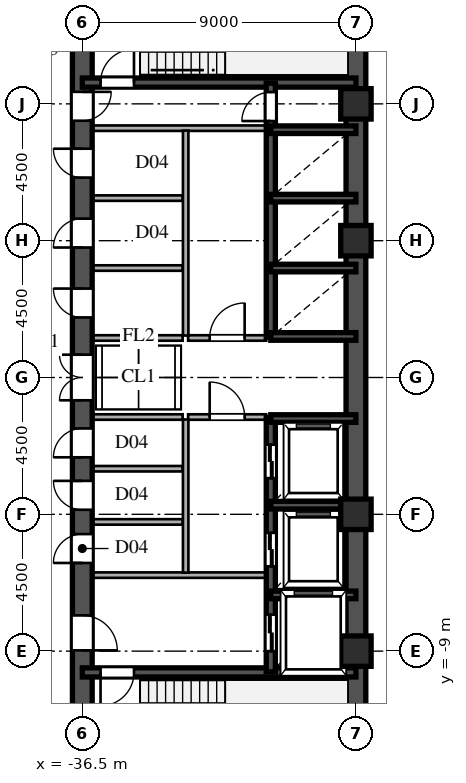
"""IFC4 building model, lengths in metres.
Left out: names, types, materials, properties, quantities, classifications, styles, units other than length and angle.
Written with IfcOpenShell. Run it as: python <this file> out.ifc"""

import sys

from ifc_helpers import new_model, si_unit, direction, frame, frame_2d, origin, origin_2d, place, context, subcontext, project, spatial, rectangle, hollow_rectangle, extrude, source, transform, mapped, element, fill, save


model = new_model("IFC4")
c1 = context("Model", 3, precision=1e-05, world=origin(), true_north=direction((0.0, 1.0)))
c2 = subcontext(c1, "Body", "Model", "MODEL_VIEW")
j1 = project(units=[si_unit("LENGTHUNIT", "METRE"), si_unit("PLANEANGLEUNIT", "RADIAN")], contexts=[c1])
p1 = place(None, origin())
s1 = spatial("IfcSite", under=j1, at=p1, CompositionType="ELEMENT")
p2 = place(p1, origin())
s2 = spatial("IfcBuilding", under=s1, at=p2, CompositionType="ELEMENT")
p3 = place(p2, frame((0.0, 0.0, 121.2)))
s3 = spatial("IfcBuildingStorey", under=s2, at=p3, CompositionType="ELEMENT", Elevation=121.2)
m1 = source(origin(), c2, "Body", "SweptSolid", [
    extrude(hollow_rectangle(XDim=1.0, YDim=1.0, WallThickness=0.042, at=origin_2d()), origin(), (0.0, 0.0, 1.0), 3.6),
])
for number, where, z_axis, x_axis in (
    (1, (-27.5, -9.0, 0.0), (0.0, 0.0, 1.0), (1.0, 0.0, 0.0)),
    (2, (-27.5, -4.5, 0.0), (0.0, 0.0, 1.0), (1.0, 0.0, 0.0)),
    (3, (-27.5, 4.5, 0.0), (0.0, 0.0, 1.0), (1.0, 0.0, 0.0)),
    (4, (-27.5, 9.0, 0.0), (0.0, 0.0, 1.0), (1.0, 0.0, 0.0)),
):
    element("IfcColumn", number, at=place(p3, frame(where, z_axis=z_axis, x_axis=x_axis)), inside=s3, PredefinedType="COLUMN", context=c2, shape_type="MappedRepresentation", body=[
        mapped(m1, transform((0.0, 0.0, 0.0), scale=1.0)),
    ])
for number, where, z_axis, x_axis in (
    (5, (-27.5, -13.5, 0.0), (0.0, 0.0, 1.0), (0.0, 1.0, 0.0)),
    (6, (-27.5, 1.3, 0.0), (0.0, 0.0, 1.0), (0.0, 1.0, 0.0)),
):
    element("IfcWall", number, at=place(p3, frame(where, z_axis=z_axis, x_axis=x_axis)), inside=s3, PredefinedType="SHEAR", context=c2, shape_type="SweptSolid", body=[
        extrude(rectangle(XDim=12.2, YDim=0.65, at=frame_2d((6.1, 0.0))), origin(), (0.0, 0.0, 1.0), 3.38),
    ])
p4 = place(p3, frame((-27.5, -1.3, 0.0), z_axis=(0.0, 0.0, 1.0), x_axis=(0.0, 1.0, 0.0)))
e7 = element("IfcWall", 7, at=p4, inside=s3, PredefinedType="SHEAR", context=c2, shape_type="SweptSolid", body=[
    extrude(rectangle(XDim=2.6, YDim=0.65, at=frame_2d((1.3, 0.0))), origin(), (0.0, 0.0, 1.0), 3.38),
])
p5 = place(p3, frame((-36.5, -13.65, 0.0), z_axis=(0.0, 0.0, 1.0), x_axis=(0.0, 1.0, 0.0)))
e8 = element("IfcWall", 8, at=p5, inside=s3, PredefinedType="SHEAR", context=c2, shape_type="SweptSolid", body=[
    extrude(rectangle(XDim=7.15, YDim=0.65, at=frame_2d((3.575, 0.0))), origin(), (0.0, 0.0, 1.0), 3.38),
])
p6 = place(p5, frame((4.675, 0.0, 0.0)))
e9 = element("IfcOpeningElement", 9, at=p6, cuts=e8, PredefinedType="OPENING", context=c2, shape_type="SweptSolid", body=[
    extrude(rectangle(XDim=1.15, YDim=2.2, at=frame_2d((0.575, 1.1))), frame((0.0, 0.335, 0.0), z_axis=(0.0, -1.0, 0.0), x_axis=(1.0, 0.0, 0.0)), (0.0, 0.0, 1.0), 0.67),
])
p7 = place(p3, frame((-36.5, -1.3, 0.0), z_axis=(0.0, 0.0, 1.0), x_axis=(0.0, 1.0, 0.0)))
e10 = element("IfcWall", 10, at=p7, inside=s3, PredefinedType="SHEAR", context=c2, shape_type="SweptSolid", body=[
    extrude(rectangle(XDim=2.6, YDim=0.65, at=frame_2d((1.3, 0.0))), origin(), (0.0, 0.0, 1.0), 3.38),
])
p8 = place(p7, frame((0.55, 0.0, 0.0)))
e11 = element("IfcOpeningElement", 11, at=p8, cuts=e10, PredefinedType="OPENING", context=c2, shape_type="SweptSolid", body=[
    extrude(rectangle(XDim=1.5, YDim=2.3, at=frame_2d((0.75, 1.15))), frame((0.0, 0.335, 0.0), z_axis=(0.0, -1.0, 0.0), x_axis=(1.0, 0.0, 0.0)), (0.0, 0.0, 1.0), 0.67),
])
p9 = place(p3, frame((-36.5, 8.2, 0.0), z_axis=(0.0, 0.0, 1.0), x_axis=(0.0, 1.0, 0.0)))
e12 = element("IfcWall", 12, at=p9, inside=s3, PredefinedType="SHEAR", context=c2, shape_type="SweptSolid", body=[
    extrude(rectangle(XDim=5.45, YDim=0.65, at=frame_2d((2.725, 0.0))), origin(), (0.0, 0.0, 1.0), 3.38),
])
p10 = place(p9, frame((0.245, 0.0, 0.0)))
e13 = element("IfcOpeningElement", 13, at=p10, cuts=e12, PredefinedType="OPENING", context=c2, shape_type="SweptSolid", body=[
    extrude(rectangle(XDim=0.95, YDim=2.15, at=frame_2d((0.475, 1.075))), frame((0.0, 0.335, 0.0), z_axis=(0.0, -1.0, 0.0), x_axis=(1.0, 0.0, 0.0)), (0.0, 0.0, 1.0), 0.67),
])
p11 = place(p3, frame((-36.5, -6.5, 0.0), z_axis=(0.0, 0.0, 1.0), x_axis=(0.0, 1.0, 0.0)))
e14 = element("IfcWall", 14, at=p11, inside=s3, PredefinedType="SHEAR", context=c2, shape_type="SweptSolid", body=[
    extrude(rectangle(XDim=1.75, YDim=0.65, at=frame_2d((0.875, 0.0))), origin(), (0.0, 0.0, 1.0), 3.38),
])
p12 = place(p11, frame((0.4, 0.0, 0.0)))
e15 = element("IfcOpeningElement", 15, at=p12, cuts=e14, PredefinedType="OPENING", context=c2, shape_type="SweptSolid", body=[
    extrude(rectangle(XDim=0.95, YDim=2.15, at=frame_2d((0.475, 1.075))), frame((0.0, 0.335, 0.0), z_axis=(0.0, -1.0, 0.0), x_axis=(1.0, 0.0, 0.0)), (0.0, 0.0, 1.0), 0.67),
])
p13 = place(p3, frame((-36.5, -4.75, 0.0), z_axis=(0.0, 0.0, 1.0), x_axis=(0.0, 1.0, 0.0)))
e16 = element("IfcWall", 16, at=p13, inside=s3, PredefinedType="SHEAR", context=c2, shape_type="SweptSolid", body=[
    extrude(rectangle(XDim=1.75, YDim=0.65, at=frame_2d((0.875, 0.0))), origin(), (0.0, 0.0, 1.0), 3.38),
])
p14 = place(p13, frame((0.4, 0.0, 0.0)))
e17 = element("IfcOpeningElement", 17, at=p14, cuts=e16, PredefinedType="OPENING", context=c2, shape_type="SweptSolid", body=[
    extrude(rectangle(XDim=0.95, YDim=2.15, at=frame_2d((0.475, 1.075))), frame((0.0, 0.335, 0.0), z_axis=(0.0, -1.0, 0.0), x_axis=(1.0, 0.0, 0.0)), (0.0, 0.0, 1.0), 0.67),
])
p15 = place(p3, frame((-36.5, -3.0, 0.0), z_axis=(0.0, 0.0, 1.0), x_axis=(0.0, 1.0, 0.0)))
e18 = element("IfcWall", 18, at=p15, inside=s3, PredefinedType="SHEAR", context=c2, shape_type="SweptSolid", body=[
    extrude(rectangle(XDim=1.7, YDim=0.65, at=frame_2d((0.85, 0.0))), origin(), (0.0, 0.0, 1.0), 3.38),
])
p16 = place(p15, frame((0.375, 0.0, 0.0)))
e19 = element("IfcOpeningElement", 19, at=p16, cuts=e18, PredefinedType="OPENING", context=c2, shape_type="SweptSolid", body=[
    extrude(rectangle(XDim=0.95, YDim=2.15, at=frame_2d((0.475, 1.075))), frame((0.0, 0.335, 0.0), z_axis=(0.0, -1.0, 0.0), x_axis=(1.0, 0.0, 0.0)), (0.0, 0.0, 1.0), 0.67),
])
p17 = place(p3, frame((-36.5, 1.3, 0.0), z_axis=(0.0, 0.0, 1.0), x_axis=(0.0, 1.0, 0.0)))
e20 = element("IfcWall", 20, at=p17, inside=s3, PredefinedType="SHEAR", context=c2, shape_type="SweptSolid", body=[
    extrude(rectangle(XDim=2.3, YDim=0.65, at=frame_2d((1.15, 0.0))), origin(), (0.0, 0.0, 1.0), 3.38),
])
p18 = place(p17, frame((0.675, 0.0, 0.0)))
e21 = element("IfcOpeningElement", 21, at=p18, cuts=e20, PredefinedType="OPENING", context=c2, shape_type="SweptSolid", body=[
    extrude(rectangle(XDim=0.95, YDim=2.15, at=frame_2d((0.475, 1.075))), frame((0.0, 0.335, 0.0), z_axis=(0.0, -1.0, 0.0), x_axis=(1.0, 0.0, 0.0)), (0.0, 0.0, 1.0), 0.67),
])
p19 = place(p3, frame((-36.5, 3.6, 0.0), z_axis=(0.0, 0.0, 1.0), x_axis=(0.0, 1.0, 0.0)))
e22 = element("IfcWall", 22, at=p19, inside=s3, PredefinedType="SHEAR", context=c2, shape_type="SweptSolid", body=[
    extrude(rectangle(XDim=2.3, YDim=0.65, at=frame_2d((1.15, 0.0))), origin(), (0.0, 0.0, 1.0), 3.38),
])
p20 = place(p19, frame((0.675, 0.0, 0.0)))
e23 = element("IfcOpeningElement", 23, at=p20, cuts=e22, PredefinedType="OPENING", context=c2, shape_type="SweptSolid", body=[
    extrude(rectangle(XDim=0.95, YDim=2.15, at=frame_2d((0.475, 1.075))), frame((0.0, 0.335, 0.0), z_axis=(0.0, -1.0, 0.0), x_axis=(1.0, 0.0, 0.0)), (0.0, 0.0, 1.0), 0.67),
])
p21 = place(p3, frame((-36.5, 5.9, 0.0), z_axis=(0.0, 0.0, 1.0), x_axis=(0.0, 1.0, 0.0)))
e24 = element("IfcWall", 24, at=p21, inside=s3, PredefinedType="SHEAR", context=c2, shape_type="SweptSolid", body=[
    extrude(rectangle(XDim=2.3, YDim=0.65, at=frame_2d((1.15, 0.0))), origin(), (0.0, 0.0, 1.0), 3.38),
])
p22 = place(p21, frame((0.675, 0.0, 0.0)))
e25 = element("IfcOpeningElement", 25, at=p22, cuts=e24, PredefinedType="OPENING", context=c2, shape_type="SweptSolid", body=[
    extrude(rectangle(XDim=0.95, YDim=2.15, at=frame_2d((0.475, 1.075))), frame((0.0, 0.335, 0.0), z_axis=(0.0, -1.0, 0.0), x_axis=(1.0, 0.0, 0.0)), (0.0, 0.0, 1.0), 0.67),
])
p23 = place(p3, frame((-36.5, -9.7, 0.0), z_axis=(0.0, 0.0, 1.0), x_axis=(1.0, 0.0, 0.0)))
e26 = element("IfcWall", 26, at=p23, inside=s3, PredefinedType="SHEAR", context=c2, shape_type="SweptSolid", body=[
    extrude(rectangle(XDim=9.0, YDim=0.3, at=frame_2d((4.5, 0.0))), origin(), (0.0, 0.0, 1.0), 3.38),
])
p24 = place(p23, frame((0.6, 0.0, 0.0)))
e27 = element("IfcOpeningElement", 27, at=p24, cuts=e26, PredefinedType="OPENING", context=c2, shape_type="SweptSolid", body=[
    extrude(rectangle(XDim=1.1, YDim=2.2, at=frame_2d((0.55, 1.1))), frame((0.0, 0.16, 0.0), z_axis=(0.0, -1.0, 0.0), x_axis=(1.0, 0.0, 0.0)), (0.0, 0.0, 1.0), 0.32),
])
p25 = place(p3, frame((-36.5, 9.7, 0.0), z_axis=(0.0, 0.0, 1.0), x_axis=(1.0, 0.0, 0.0)))
e28 = element("IfcWall", 28, at=p25, inside=s3, PredefinedType="SHEAR", context=c2, shape_type="SweptSolid", body=[
    extrude(rectangle(XDim=9.0, YDim=0.3, at=frame_2d((4.5, 0.0))), origin(), (0.0, 0.0, 1.0), 3.38),
])
p26 = place(p25, frame((0.6, 0.0, 0.0)))
e29 = element("IfcOpeningElement", 29, at=p26, cuts=e28, PredefinedType="OPENING", context=c2, shape_type="SweptSolid", body=[
    extrude(rectangle(XDim=1.1, YDim=2.2, at=frame_2d((0.55, 1.1))), frame((0.0, 0.16, 0.0), z_axis=(0.0, -1.0, 0.0), x_axis=(1.0, 0.0, 0.0)), (0.0, 0.0, 1.0), 0.32),
])
for number, where, z_axis, x_axis in (
    (30, (-30.3, -7.15, 0.0), (0.0, 0.0, 1.0), (1.0, 0.0, 0.0)),
    (31, (-30.3, -4.2, 0.0), (0.0, 0.0, 1.0), (1.0, 0.0, 0.0)),
    (32, (-30.3, -1.35, 0.0), (0.0, 0.0, 1.0), (1.0, 0.0, 0.0)),
    (33, (-30.3, 1.35, 0.0), (0.0, 0.0, 1.0), (1.0, 0.0, 0.0)),
    (34, (-30.3, 3.6, 0.0), (0.0, 0.0, 1.0), (1.0, 0.0, 0.0)),
    (35, (-30.3, 5.9, 0.0), (0.0, 0.0, 1.0), (1.0, 0.0, 0.0)),
    (36, (-30.3, 8.15, 0.0), (0.0, 0.0, 1.0), (1.0, 0.0, 0.0)),
):
    element("IfcWall", number, at=place(p3, frame(where, z_axis=z_axis, x_axis=x_axis)), inside=s3, PredefinedType="SHEAR", context=c2, shape_type="SweptSolid", body=[
        extrude(rectangle(XDim=2.8, YDim=0.25, at=frame_2d((1.4, 0.0))), origin(), (0.0, 0.0, 1.0), 3.38),
    ])
p27 = place(p3, frame((-30.3, -9.68, 0.0), z_axis=(0.0, 0.0, 1.0), x_axis=(0.0, 1.0, 0.0)))
e37 = element("IfcWall", 37, at=p27, inside=s3, PredefinedType="SHEAR", context=c2, shape_type="SweptSolid", body=[
    extrude(rectangle(XDim=2.56, YDim=0.3, at=frame_2d((1.28, 0.0))), origin(), (0.0, 0.0, 1.0), 3.38),
])
p28 = place(p27, frame((0.68, 0.0, 0.0)))
e38 = element("IfcOpeningElement", 38, at=p28, cuts=e37, PredefinedType="OPENING", context=c2, shape_type="SweptSolid", body=[
    extrude(rectangle(XDim=1.2, YDim=2.25, at=frame_2d((0.6, 1.125))), frame((0.0, 0.16, 0.0), z_axis=(0.0, -1.0, 0.0), x_axis=(1.0, 0.0, 0.0)), (0.0, 0.0, 1.0), 0.32),
])
p29 = place(p3, frame((-30.3, -7.12, 0.0), z_axis=(0.0, 0.0, 1.0), x_axis=(0.0, 1.0, 0.0)))
e39 = element("IfcWall", 39, at=p29, inside=s3, PredefinedType="SHEAR", context=c2, shape_type="SweptSolid", body=[
    extrude(rectangle(XDim=2.92, YDim=0.3, at=frame_2d((1.46, 0.0))), origin(), (0.0, 0.0, 1.0), 3.38),
])
p30 = place(p29, frame((0.91, 0.0, 0.0)))
e40 = element("IfcOpeningElement", 40, at=p30, cuts=e39, PredefinedType="OPENING", context=c2, shape_type="SweptSolid", body=[
    extrude(rectangle(XDim=1.1, YDim=2.2, at=frame_2d((0.55, 1.1))), frame((0.0, 0.16, 0.0), z_axis=(0.0, -1.0, 0.0), x_axis=(1.0, 0.0, 0.0)), (0.0, 0.0, 1.0), 0.32),
])
p31 = place(p3, frame((-30.3, -4.2, 0.0), z_axis=(0.0, 0.0, 1.0), x_axis=(0.0, 1.0, 0.0)))
e41 = element("IfcWall", 41, at=p31, inside=s3, PredefinedType="SHEAR", context=c2, shape_type="SweptSolid", body=[
    extrude(rectangle(XDim=2.88, YDim=0.3, at=frame_2d((1.44, 0.0))), origin(), (0.0, 0.0, 1.0), 3.38),
])
p32 = place(p31, frame((0.89, 0.0, 0.0)))
e42 = element("IfcOpeningElement", 42, at=p32, cuts=e41, PredefinedType="OPENING", context=c2, shape_type="SweptSolid", body=[
    extrude(rectangle(XDim=1.1, YDim=2.2, at=frame_2d((0.55, 1.1))), frame((0.0, 0.16, 0.0), z_axis=(0.0, -1.0, 0.0), x_axis=(1.0, 0.0, 0.0)), (0.0, 0.0, 1.0), 0.32),
])
p33 = place(p3, frame((-30.3, 1.32, 0.0), z_axis=(0.0, 0.0, 1.0), x_axis=(0.0, 1.0, 0.0)))
e43 = element("IfcWall", 43, at=p33, inside=s3, PredefinedType="SHEAR", context=c2, shape_type="SweptSolid", body=[
    extrude(rectangle(XDim=2.28, YDim=0.3, at=frame_2d((1.14, 0.0))), origin(), (0.0, 0.0, 1.0), 3.38),
])
p34 = place(p3, frame((-30.3, 3.6, 0.0), z_axis=(0.0, 0.0, 1.0), x_axis=(0.0, 1.0, 0.0)))
e44 = element("IfcWall", 44, at=p34, inside=s3, PredefinedType="SHEAR", context=c2, shape_type="SweptSolid", body=[
    extrude(rectangle(XDim=2.3, YDim=0.3, at=frame_2d((1.15, 0.0))), origin(), (0.0, 0.0, 1.0), 3.38),
])
p35 = place(p3, frame((-30.3, 5.9, 0.0), z_axis=(0.0, 0.0, 1.0), x_axis=(0.0, 1.0, 0.0)))
e45 = element("IfcWall", 45, at=p35, inside=s3, PredefinedType="SHEAR", context=c2, shape_type="SweptSolid", body=[
    extrude(rectangle(XDim=2.25, YDim=0.3, at=frame_2d((1.125, 0.0))), origin(), (0.0, 0.0, 1.0), 3.38),
])
p36 = place(p3, frame((-30.3, 8.15, 0.0), z_axis=(0.0, 0.0, 1.0), x_axis=(0.0, 1.0, 0.0)))
e46 = element("IfcWall", 46, at=p36, inside=s3, PredefinedType="SHEAR", context=c2, shape_type="SweptSolid", body=[
    extrude(rectangle(XDim=1.53, YDim=0.3, at=frame_2d((0.765, 0.0))), origin(), (0.0, 0.0, 1.0), 3.38),
])
p37 = place(p36, frame((0.285, 0.0, 0.0)))
e47 = element("IfcOpeningElement", 47, at=p37, cuts=e46, PredefinedType="OPENING", context=c2, shape_type="SweptSolid", body=[
    extrude(rectangle(XDim=0.95, YDim=2.15, at=frame_2d((0.475, 1.075))), frame((0.0, 0.16, 0.0), z_axis=(0.0, -1.0, 0.0), x_axis=(1.0, 0.0, 0.0)), (0.0, 0.0, 1.0), 0.32),
])
for number, where, z_axis, x_axis in (
    (48, (-36.15, -6.5, 0.0), (0.0, 0.0, 1.0), (1.0, 0.0, 0.0)),
    (49, (-36.15, 8.2, 0.0), (0.0, 0.0, 1.0), (1.0, 0.0, 0.0)),
):
    element("IfcWall", number, at=place(p3, frame(where, z_axis=z_axis, x_axis=x_axis)), inside=s3, PredefinedType="PARTITIONING", context=c2, shape_type="SweptSolid", body=[
        extrude(rectangle(XDim=5.7, YDim=0.18, at=frame_2d((2.85, 0.0))), origin(), (0.0, 0.0, 1.0), 3.38),
    ])
p38 = place(p3, frame((-33.1, -6.42, 0.0), z_axis=(0.0, 0.0, 1.0), x_axis=(0.0, 1.0, 0.0)))
e50 = element("IfcWall", 50, at=p38, inside=s3, PredefinedType="PARTITIONING", context=c2, shape_type="SweptSolid", body=[
    extrude(rectangle(XDim=5.04, YDim=0.18, at=frame_2d((2.52, 0.0))), origin(), (0.0, 0.0, 1.0), 3.38),
])
p39 = place(p3, frame((-33.1, 1.38, 0.0), z_axis=(0.0, 0.0, 1.0), x_axis=(0.0, 1.0, 0.0)))
e51 = element("IfcWall", 51, at=p39, inside=s3, PredefinedType="PARTITIONING", context=c2, shape_type="SweptSolid", body=[
    extrude(rectangle(XDim=6.74, YDim=0.18, at=frame_2d((3.37, 0.0))), origin(), (0.0, 0.0, 1.0), 3.38),
])
p40 = place(p3, frame((-33.02, -1.3, 0.0), z_axis=(0.0, 0.0, 1.0), x_axis=(1.0, 0.0, 0.0)))
e52 = element("IfcWall", 52, at=p40, inside=s3, PredefinedType="PARTITIONING", context=c2, shape_type="SweptSolid", body=[
    extrude(rectangle(XDim=2.57, YDim=0.18, at=frame_2d((1.285, 0.0))), origin(), (0.0, 0.0, 1.0), 3.38),
])
p41 = place(p40, frame((0.71, 0.0, 0.0)))
e53 = element("IfcOpeningElement", 53, at=p41, cuts=e52, PredefinedType="OPENING", context=c2, shape_type="SweptSolid", body=[
    extrude(rectangle(XDim=1.15, YDim=2.2, at=frame_2d((0.575, 1.1))), frame((0.0, 0.1, 0.0), z_axis=(0.0, -1.0, 0.0), x_axis=(1.0, 0.0, 0.0)), (0.0, 0.0, 1.0), 0.2),
])
p42 = place(p3, frame((-33.02, 1.3, 0.0), z_axis=(0.0, 0.0, 1.0), x_axis=(1.0, 0.0, 0.0)))
e54 = element("IfcWall", 54, at=p42, inside=s3, PredefinedType="PARTITIONING", context=c2, shape_type="SweptSolid", body=[
    extrude(rectangle(XDim=2.57, YDim=0.18, at=frame_2d((1.285, 0.0))), origin(), (0.0, 0.0, 1.0), 3.38),
])
p43 = place(p42, frame((0.71, 0.0, 0.0)))
e55 = element("IfcOpeningElement", 55, at=p43, cuts=e54, PredefinedType="OPENING", context=c2, shape_type="SweptSolid", body=[
    extrude(rectangle(XDim=1.15, YDim=2.2, at=frame_2d((0.575, 1.1))), frame((0.0, 0.1, 0.0), z_axis=(0.0, -1.0, 0.0), x_axis=(1.0, 0.0, 0.0)), (0.0, 0.0, 1.0), 0.2),
])
for number, where, z_axis, x_axis in (
    (56, (-36.15, -1.3, 0.0), (0.0, 0.0, 1.0), (1.0, 0.0, 0.0)),
    (57, (-36.15, 1.3, 0.0), (0.0, 0.0, 1.0), (1.0, 0.0, 0.0)),
    (58, (-36.15, -4.75, 0.0), (0.0, 0.0, 1.0), (1.0, 0.0, 0.0)),
    (59, (-36.15, -3.0, 0.0), (0.0, 0.0, 1.0), (1.0, 0.0, 0.0)),
    (60, (-36.15, 3.6, 0.0), (0.0, 0.0, 1.0), (1.0, 0.0, 0.0)),
    (61, (-36.15, 5.9, 0.0), (0.0, 0.0, 1.0), (1.0, 0.0, 0.0)),
):
    element("IfcWall", number, at=place(p3, frame(where, z_axis=z_axis, x_axis=x_axis)), inside=s3, PredefinedType="PARTITIONING", context=c2, shape_type="SweptSolid", body=[
        extrude(rectangle(XDim=2.95, YDim=0.18, at=frame_2d((1.475, 0.0))), origin(), (0.0, 0.0, 1.0), 3.38),
    ])
m2 = source(origin(), c2, "Body", "SweptSolid", [
    extrude(rectangle(XDim=1.15, YDim=2.2, at=frame_2d((0.575, 1.1))), frame((0.0, 0.025, 0.0), z_axis=(0.0, -1.0, 0.0), x_axis=(1.0, 0.0, 0.0)), (0.0, 0.0, 1.0), 0.05),
])
p44 = place(p6, frame((1.15, 0.0, 0.0), z_axis=(0.0, 0.0, 1.0), x_axis=(-1.0, 0.0, 0.0)))
e62 = element("IfcDoor", 62, at=p44, inside=s3, OperationType="SINGLE_SWING_LEFT", PredefinedType="DOOR", context=c2, shape_type="MappedRepresentation", body=[
    mapped(m2, transform((0.0, 0.0, 0.0), scale=1.0)),
])
fill(e9, e62)
m3 = source(origin(), c2, "Body", "SweptSolid", [
    extrude(rectangle(XDim=1.5, YDim=2.3, at=frame_2d((0.75, 1.15))), frame((0.0, 0.025, 0.0), z_axis=(0.0, -1.0, 0.0), x_axis=(1.0, 0.0, 0.0)), (0.0, 0.0, 1.0), 0.05),
])
p45 = place(p8, origin())
e63 = element("IfcDoor", 63, at=p45, inside=s3, OperationType="DOUBLE_SWING_LEFT", PredefinedType="DOOR", context=c2, shape_type="MappedRepresentation", body=[
    mapped(m3, transform((0.0, 0.0, 0.0), scale=1.0)),
])
fill(e11, e63)
m4 = source(origin(), c2, "Body", "SweptSolid", [
    extrude(rectangle(XDim=0.95, YDim=2.15, at=frame_2d((0.475, 1.075))), frame((0.0, 0.025, 0.0), z_axis=(0.0, -1.0, 0.0), x_axis=(1.0, 0.0, 0.0)), (0.0, 0.0, 1.0), 0.05),
])
p46 = place(p10, frame((0.95, 0.0, 0.0), z_axis=(0.0, 0.0, 1.0), x_axis=(-1.0, 0.0, 0.0)))
e64 = element("IfcDoor", 64, at=p46, inside=s3, OperationType="SINGLE_SWING_RIGHT", PredefinedType="DOOR", context=c2, shape_type="MappedRepresentation", body=[
    mapped(m4, transform((0.0, 0.0, 0.0), scale=1.0)),
])
fill(e13, e64)
p47 = place(p12, origin())
e65 = element("IfcDoor", 65, at=p47, inside=s3, OperationType="SINGLE_SWING_LEFT", PredefinedType="DOOR", context=c2, shape_type="MappedRepresentation", body=[
    mapped(m4, transform((0.0, 0.0, 0.0), scale=1.0)),
])
fill(e15, e65)
p48 = place(p14, origin())
e66 = element("IfcDoor", 66, at=p48, inside=s3, OperationType="SINGLE_SWING_RIGHT", PredefinedType="DOOR", context=c2, shape_type="MappedRepresentation", body=[
    mapped(m4, transform((0.0, 0.0, 0.0), scale=1.0)),
])
fill(e17, e66)
p49 = place(p16, origin())
e67 = element("IfcDoor", 67, at=p49, inside=s3, OperationType="SINGLE_SWING_LEFT", PredefinedType="DOOR", context=c2, shape_type="MappedRepresentation", body=[
    mapped(m4, transform((0.0, 0.0, 0.0), scale=1.0)),
])
fill(e19, e67)
p50 = place(p18, origin())
e68 = element("IfcDoor", 68, at=p50, inside=s3, OperationType="SINGLE_SWING_RIGHT", PredefinedType="DOOR", context=c2, shape_type="MappedRepresentation", body=[
    mapped(m4, transform((0.0, 0.0, 0.0), scale=1.0)),
])
fill(e21, e68)
p51 = place(p20, origin())
e69 = element("IfcDoor", 69, at=p51, inside=s3, OperationType="SINGLE_SWING_LEFT", PredefinedType="DOOR", context=c2, shape_type="MappedRepresentation", body=[
    mapped(m4, transform((0.0, 0.0, 0.0), scale=1.0)),
])
fill(e23, e69)
p52 = place(p22, origin())
e70 = element("IfcDoor", 70, at=p52, inside=s3, OperationType="SINGLE_SWING_RIGHT", PredefinedType="DOOR", context=c2, shape_type="MappedRepresentation", body=[
    mapped(m4, transform((0.0, 0.0, 0.0), scale=1.0)),
])
fill(e25, e70)
m5 = source(origin(), c2, "Body", "SweptSolid", [
    extrude(rectangle(XDim=1.1, YDim=2.2, at=frame_2d((0.55, 1.1))), frame((0.0, 0.025, 0.0), z_axis=(0.0, -1.0, 0.0), x_axis=(1.0, 0.0, 0.0)), (0.0, 0.0, 1.0), 0.05),
])
p53 = place(p24, frame((1.1, 0.0, 0.0), z_axis=(0.0, 0.0, 1.0), x_axis=(-1.0, 0.0, 0.0)))
e71 = element("IfcDoor", 71, at=p53, inside=s3, OperationType="SINGLE_SWING_LEFT", PredefinedType="DOOR", context=c2, shape_type="MappedRepresentation", body=[
    mapped(m5, transform((0.0, 0.0, 0.0), scale=1.0)),
])
fill(e27, e71)
p54 = place(p26, origin())
e72 = element("IfcDoor", 72, at=p54, inside=s3, OperationType="SINGLE_SWING_RIGHT", PredefinedType="DOOR", context=c2, shape_type="MappedRepresentation", body=[
    mapped(m5, transform((0.0, 0.0, 0.0), scale=1.0)),
])
fill(e29, e72)
m6 = source(origin(), c2, "Body", "SweptSolid", [
    extrude(rectangle(XDim=1.2, YDim=2.25, at=frame_2d((0.6, 1.125))), frame((0.0, 0.025, 0.0), z_axis=(0.0, -1.0, 0.0), x_axis=(1.0, 0.0, 0.0)), (0.0, 0.0, 1.0), 0.05),
])
p55 = place(p28, origin())
e73 = element("IfcDoor", 73, at=p55, inside=s3, OperationType="DOUBLE_DOOR_SLIDING", PredefinedType="DOOR", context=c2, shape_type="MappedRepresentation", body=[
    mapped(m6, transform((0.0, 0.0, 0.0), scale=1.0)),
])
fill(e38, e73)
m7 = source(origin(), c2, "Body", "SweptSolid", [
    extrude(rectangle(XDim=1.1, YDim=2.2, at=frame_2d((0.55, 1.1))), frame((0.0, 0.025, 0.0), z_axis=(0.0, -1.0, 0.0), x_axis=(1.0, 0.0, 0.0)), (0.0, 0.0, 1.0), 0.05),
])
p56 = place(p30, origin())
e74 = element("IfcDoor", 74, at=p56, inside=s3, OperationType="DOUBLE_DOOR_SLIDING", PredefinedType="DOOR", context=c2, shape_type="MappedRepresentation", body=[
    mapped(m7, transform((0.0, 0.0, 0.0), scale=1.0)),
])
fill(e40, e74)
p57 = place(p32, origin())
e75 = element("IfcDoor", 75, at=p57, inside=s3, OperationType="DOUBLE_DOOR_SLIDING", PredefinedType="DOOR", context=c2, shape_type="MappedRepresentation", body=[
    mapped(m7, transform((0.0, 0.0, 0.0), scale=1.0)),
])
fill(e42, e75)
p58 = place(p37, origin())
e76 = element("IfcDoor", 76, at=p58, inside=s3, OperationType="SINGLE_SWING_LEFT", PredefinedType="DOOR", context=c2, shape_type="MappedRepresentation", body=[
    mapped(m4, transform((0.0, 0.0, 0.0), scale=1.0)),
])
fill(e47, e76)
p59 = place(p41, origin())
e77 = element("IfcDoor", 77, at=p59, inside=s3, OperationType="SINGLE_SWING_LEFT", PredefinedType="DOOR", context=c2, shape_type="MappedRepresentation", body=[
    mapped(m2, transform((0.0, 0.0, 0.0), scale=1.0)),
])
fill(e53, e77)
p60 = place(p43, origin())
e78 = element("IfcDoor", 78, at=p60, inside=s3, OperationType="SINGLE_SWING_RIGHT", PredefinedType="DOOR", context=c2, shape_type="MappedRepresentation", body=[
    mapped(m2, transform((0.0, 0.0, 0.0), scale=1.0)),
])
fill(e55, e78)
save(model, sys.argv[1])
